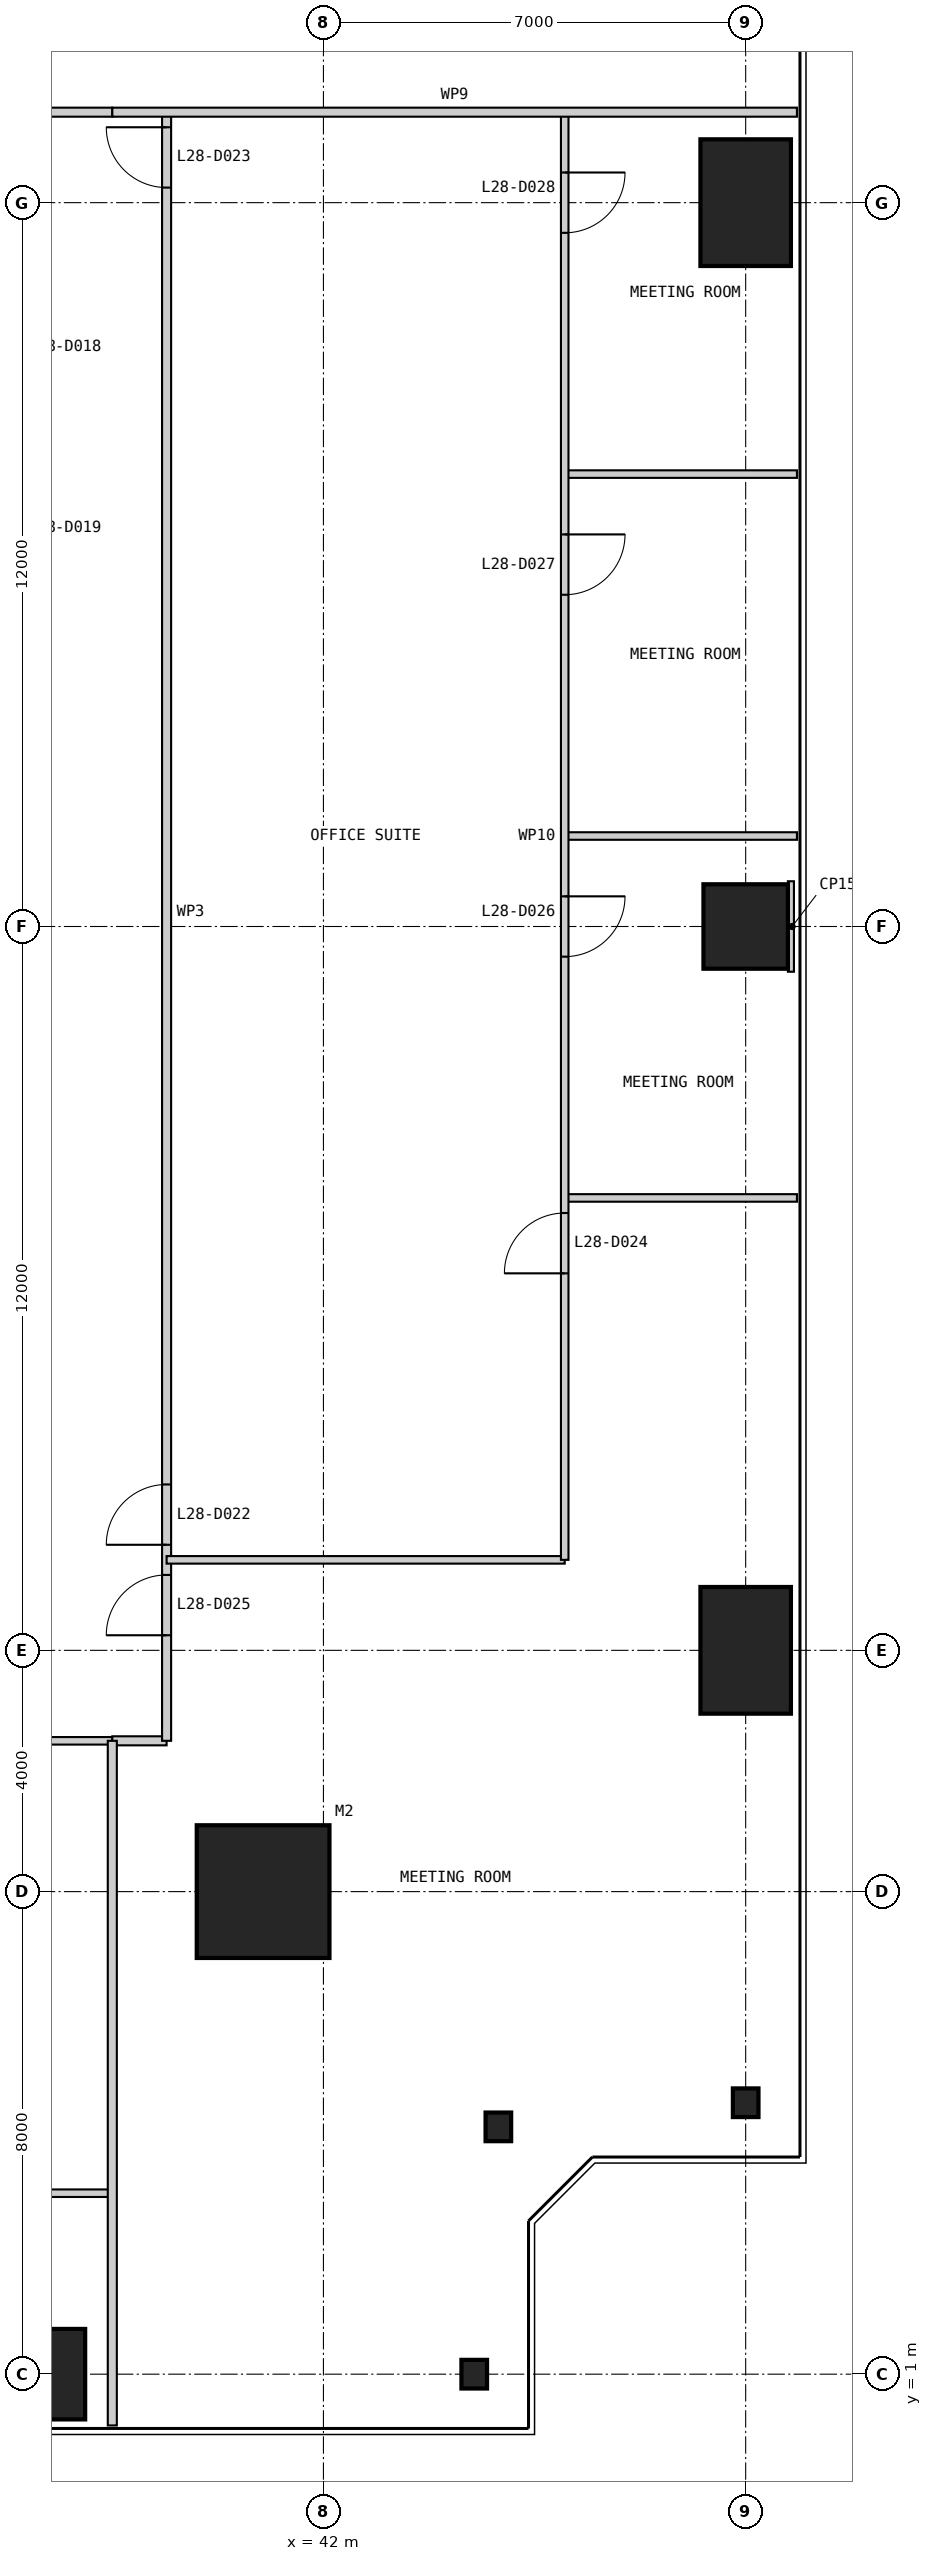
"""IFC4 building model, lengths in metres.
Left out: names, types, materials, properties, quantities, classifications, styles, units other than length and angle.
Written with IfcOpenShell. Run it as: python <this file> out.ifc"""

import sys

from ifc_helpers import new_model, si_unit, direction, frame, frame_2d, origin, origin_2d, place, context, subcontext, project, spatial, rectangle, i_section, extrude, element, fill, save


model = new_model("IFC4")
c1 = context("Model", 3, precision=1e-05, world=origin(), true_north=direction((0.0, 1.0)))
c2 = subcontext(c1, "Body", "Model", "MODEL_VIEW")
j1 = project(units=[si_unit("LENGTHUNIT", "METRE"), si_unit("PLANEANGLEUNIT", "RADIAN")], contexts=[c1])
p1 = place(None, origin())
s1 = spatial("IfcSite", under=j1, at=p1, CompositionType="ELEMENT")
p2 = place(p1, origin())
s2 = spatial("IfcBuilding", under=s1, at=p2, CompositionType="ELEMENT")
p3 = place(p2, frame((0.0, 0.0, 122.4)))
s3 = spatial("IfcBuildingStorey", under=s2, at=p3, CompositionType="ELEMENT", Elevation=122.4)
p4 = place(p3, frame((41.0, 9.0, 0.0), z_axis=(0.0, 0.0, 1.0), x_axis=(1.0, 0.0, 0.0)))
e1 = element("IfcColumn", 1, at=p4, inside=s3, PredefinedType="COLUMN", context=c2, shape_type="SweptSolid", body=[
    extrude(rectangle(XDim=2.2, YDim=2.2, at=origin_2d()), origin(), (0.0, 0.0, 1.0), 4.0),
])
p5 = place(p3, frame((37.0, 1.0, 0.0), z_axis=(0.0, 0.0, 1.0), x_axis=(1.0, 0.0, 0.0)))
e2 = element("IfcColumn", 2, at=p5, inside=s3, PredefinedType="COLUMN", context=c2, shape_type="SweptSolid", body=[
    extrude(rectangle(XDim=2.1, YDim=1.5, at=origin_2d()), origin(), (0.0, 0.0, 1.0), 4.0),
])
for number, where, z_axis, x_axis in (
    (3, (44.5, 1.0, 0.0), (0.0, 0.0, 1.0), (1.0, 0.0, 0.0)),
    (4, (44.9, 5.1, 0.0), (0.0, 0.0, 1.0), (1.0, 0.0, 0.0)),
    (5, (49.0, 5.5, 0.0), (0.0, 0.0, 1.0), (1.0, 0.0, 0.0)),
):
    element("IfcColumn", number, at=place(p3, frame(where, z_axis=z_axis, x_axis=x_axis)), inside=s3, PredefinedType="COLUMN", context=c2, shape_type="SweptSolid", body=[
        extrude(i_section(OverallWidth=0.424, OverallDepth=0.475, WebThickness=0.048, FlangeThickness=0.077, at=origin_2d()), origin(), (0.0, 0.0, 1.0), 4.0),
    ])
p6 = place(p3, frame((49.0, 13.0, 0.0), z_axis=(0.0, 0.0, 1.0), x_axis=(1.0, 0.0, 0.0)))
e6 = element("IfcColumn", 6, at=p6, inside=s3, PredefinedType="COLUMN", context=c2, shape_type="SweptSolid", body=[
    extrude(rectangle(XDim=1.5, YDim=2.1, at=origin_2d()), origin(), (0.0, 0.0, 1.0), 4.0),
])
p7 = place(p3, frame((49.0, 25.0, 0.0), z_axis=(0.0, 0.0, 1.0), x_axis=(1.0, 0.0, 0.0)))
e7 = element("IfcColumn", 7, at=p7, inside=s3, PredefinedType="COLUMN", context=c2, shape_type="SweptSolid", body=[
    extrude(rectangle(XDim=1.4, YDim=1.4, at=origin_2d()), origin(), (0.0, 0.0, 1.0), 4.0),
])
p8 = place(p3, frame((49.0, 37.0, 0.0), z_axis=(0.0, 0.0, 1.0), x_axis=(1.0, 0.0, 0.0)))
e8 = element("IfcColumn", 8, at=p8, inside=s3, PredefinedType="COLUMN", context=c2, shape_type="SweptSolid", body=[
    extrude(rectangle(XDim=1.5, YDim=2.1, at=origin_2d()), origin(), (0.0, 0.0, 1.0), 4.0),
])
p9 = place(p3, frame((32.5, 4.0, 0.0), z_axis=(0.0, 0.0, 1.0), x_axis=(1.0, 0.0, 0.0)))
e9 = element("IfcWall", 9, at=p9, inside=s3, PredefinedType="PARTITIONING", context=c2, shape_type="SweptSolid", body=[
    extrude(rectangle(XDim=6.0, YDim=0.125, at=frame_2d((3.0, 0.0))), origin(), (0.0, 0.0, 1.0), 3.85),
])
p10 = place(p3, frame((35.5, 11.5, 0.0), z_axis=(0.0, 0.0, 1.0), x_axis=(1.0, 0.0, 0.0)))
e10 = element("IfcWall", 10, at=p10, inside=s3, PredefinedType="PARTITIONING", context=c2, shape_type="SweptSolid", body=[
    extrude(rectangle(XDim=3.0, YDim=0.125, at=frame_2d((1.5, 0.0))), origin(), (0.0, 0.0, 1.0), 3.85),
])
p11 = place(p3, frame((38.5, 11.5, 0.0), z_axis=(0.0, 0.0, 1.0), x_axis=(1.0, 0.0, 0.0)))
e11 = element("IfcWall", 11, at=p11, inside=s3, PredefinedType="PARTITIONING", context=c2, shape_type="SweptSolid", body=[
    extrude(rectangle(XDim=0.9, YDim=0.15, at=frame_2d((0.45, 0.0))), origin(), (0.0, 0.0, 1.0), 3.85),
])
p12 = place(p3, frame((39.4, 11.5, 0.0), z_axis=(0.0, 0.0, 1.0), x_axis=(0.0, 1.0, 0.0)))
e12 = element("IfcWall", 12, at=p12, inside=s3, PredefinedType="PARTITIONING", context=c2, shape_type="SweptSolid", body=[
    extrude(rectangle(XDim=27.0, YDim=0.15, at=frame_2d((13.5, 0.0))), origin(), (0.0, 0.0, 1.0), 3.85),
])
p13 = place(p12, frame((3.25, 0.0, 0.0)))
e13 = element("IfcOpeningElement", 13, at=p13, cuts=e12, PredefinedType="OPENING", context=c2, shape_type="SweptSolid", body=[
    extrude(rectangle(XDim=1.0, YDim=2.2, at=frame_2d((0.5, 1.1))), frame((0.0, 0.085, 0.0), z_axis=(0.0, -1.0, 0.0), x_axis=(1.0, 0.0, 0.0)), (0.0, 0.0, 1.0), 0.17),
])
p14 = place(p12, frame((25.75, 0.0, 0.0)))
e14 = element("IfcOpeningElement", 14, at=p14, cuts=e12, PredefinedType="OPENING", context=c2, shape_type="SweptSolid", body=[
    extrude(rectangle(XDim=1.0, YDim=2.2, at=frame_2d((0.5, 1.1))), frame((0.0, 0.085, 0.0), z_axis=(0.0, -1.0, 0.0), x_axis=(1.0, 0.0, 0.0)), (0.0, 0.0, 1.0), 0.17),
])
p15 = place(p12, frame((1.75, 0.0, 0.0)))
e15 = element("IfcOpeningElement", 15, at=p15, cuts=e12, PredefinedType="OPENING", context=c2, shape_type="SweptSolid", body=[
    extrude(rectangle(XDim=1.0, YDim=2.2, at=frame_2d((0.5, 1.1))), frame((0.0, 0.085, 0.0), z_axis=(0.0, -1.0, 0.0), x_axis=(1.0, 0.0, 0.0)), (0.0, 0.0, 1.0), 0.17),
])
p16 = place(p3, frame((38.5, 0.15, 0.0), z_axis=(0.0, 0.0, 1.0), x_axis=(0.0, 1.0, 0.0)))
e16 = element("IfcWall", 16, at=p16, inside=s3, PredefinedType="PARTITIONING", context=c2, shape_type="SweptSolid", body=[
    extrude(rectangle(XDim=11.35, YDim=0.15, at=frame_2d((5.675, 0.0))), origin(), (0.0, 0.0, 1.0), 3.85),
])
p17 = place(p3, frame((46.0, 14.5, 0.0), z_axis=(0.0, 0.0, 1.0), x_axis=(-1.0, 0.0, 0.0)))
e17 = element("IfcWall", 17, at=p17, inside=s3, PredefinedType="PARTITIONING", context=c2, shape_type="SweptSolid", body=[
    extrude(rectangle(XDim=6.6, YDim=0.125, at=frame_2d((3.3, 0.0))), origin(), (0.0, 0.0, 1.0), 3.85),
])
for number, where, z_axis, x_axis in (
    (18, (49.85, 20.5, 0.0), (0.0, 0.0, 1.0), (-1.0, 0.0, 0.0)),
    (19, (49.85, 26.5, 0.0), (0.0, 0.0, 1.0), (-1.0, 0.0, 0.0)),
    (20, (49.85, 32.5, 0.0), (0.0, 0.0, 1.0), (-1.0, 0.0, 0.0)),
):
    element("IfcWall", number, at=place(p3, frame(where, z_axis=z_axis, x_axis=x_axis)), inside=s3, PredefinedType="PARTITIONING", context=c2, shape_type="SweptSolid", body=[
        extrude(rectangle(XDim=3.85, YDim=0.125, at=frame_2d((1.925, 0.0))), origin(), (0.0, 0.0, 1.0), 3.85),
    ])
p18 = place(p3, frame((46.0, 14.5, 0.0), z_axis=(0.0, 0.0, 1.0), x_axis=(0.0, 1.0, 0.0)))
e21 = element("IfcWall", 21, at=p18, inside=s3, PredefinedType="PARTITIONING", context=c2, shape_type="SweptSolid", body=[
    extrude(rectangle(XDim=24.0, YDim=0.125, at=frame_2d((12.0, 0.0))), origin(), (0.0, 0.0, 1.0), 3.238),
])
p19 = place(p18, frame((4.75, 0.0, 0.0)))
e22 = element("IfcOpeningElement", 22, at=p19, cuts=e21, PredefinedType="OPENING", context=c2, shape_type="SweptSolid", body=[
    extrude(rectangle(XDim=1.0, YDim=2.2, at=frame_2d((0.5, 1.1))), frame((0.0, 0.073, 0.0), z_axis=(0.0, -1.0, 0.0), x_axis=(1.0, 0.0, 0.0)), (0.0, 0.0, 1.0), 0.145),
])
p20 = place(p18, frame((10.0, 0.0, 0.0)))
e23 = element("IfcOpeningElement", 23, at=p20, cuts=e21, PredefinedType="OPENING", context=c2, shape_type="SweptSolid", body=[
    extrude(rectangle(XDim=1.0, YDim=2.2, at=frame_2d((0.5, 1.1))), frame((0.0, 0.073, 0.0), z_axis=(0.0, -1.0, 0.0), x_axis=(1.0, 0.0, 0.0)), (0.0, 0.0, 1.0), 0.145),
])
p21 = place(p18, frame((16.0, 0.0, 0.0)))
e24 = element("IfcOpeningElement", 24, at=p21, cuts=e21, PredefinedType="OPENING", context=c2, shape_type="SweptSolid", body=[
    extrude(rectangle(XDim=1.0, YDim=2.2, at=frame_2d((0.5, 1.1))), frame((0.0, 0.073, 0.0), z_axis=(0.0, -1.0, 0.0), x_axis=(1.0, 0.0, 0.0)), (0.0, 0.0, 1.0), 0.145),
])
p22 = place(p18, frame((22.0, 0.0, 0.0)))
e25 = element("IfcOpeningElement", 25, at=p22, cuts=e21, PredefinedType="OPENING", context=c2, shape_type="SweptSolid", body=[
    extrude(rectangle(XDim=1.0, YDim=2.2, at=frame_2d((0.5, 1.1))), frame((0.0, 0.073, 0.0), z_axis=(0.0, -1.0, 0.0), x_axis=(1.0, 0.0, 0.0)), (0.0, 0.0, 1.0), 0.145),
])
p23 = place(p3, frame((38.5, 38.5, 0.0), z_axis=(0.0, 0.0, 1.0), x_axis=(-1.0, 0.0, 0.0)))
e26 = element("IfcWall", 26, at=p23, inside=s3, PredefinedType="PARTITIONING", context=c2, shape_type="SweptSolid", body=[
    extrude(rectangle(XDim=27.0, YDim=0.15, at=frame_2d((13.5, 0.0))), origin(), (0.0, 0.0, 1.0), 3.85),
])
p24 = place(p23, frame((2.5, 0.0, 0.0)))
e27 = element("IfcOpeningElement", 27, at=p24, cuts=e26, PredefinedType="OPENING", context=c2, shape_type="SweptSolid", body=[
    extrude(rectangle(XDim=1.0, YDim=2.2, at=frame_2d((0.5, 1.1))), frame((0.0, 0.085, 0.0), z_axis=(0.0, -1.0, 0.0), x_axis=(1.0, 0.0, 0.0)), (0.0, 0.0, 1.0), 0.17),
])
p25 = place(p23, frame((16.0, 0.0, 0.0)))
e28 = element("IfcOpeningElement", 28, at=p25, cuts=e26, PredefinedType="OPENING", context=c2, shape_type="SweptSolid", body=[
    extrude(rectangle(XDim=1.0, YDim=2.2, at=frame_2d((0.5, 1.1))), frame((0.0, 0.085, 0.0), z_axis=(0.0, -1.0, 0.0), x_axis=(1.0, 0.0, 0.0)), (0.0, 0.0, 1.0), 0.17),
])
p26 = place(p3, frame((49.85, 38.5, 0.0), z_axis=(0.0, 0.0, 1.0), x_axis=(-1.0, 0.0, 0.0)))
e29 = element("IfcWall", 29, at=p26, inside=s3, PredefinedType="PARTITIONING", context=c2, shape_type="SweptSolid", body=[
    extrude(rectangle(XDim=11.35, YDim=0.15, at=frame_2d((5.675, 0.0))), origin(), (0.0, 0.0, 1.0), 3.85),
])
p27 = place(p3, frame((49.8, 25.0, 0.0), z_axis=(0.0, 0.0, 1.0), x_axis=(-1.0, 0.0, 0.0)))
e30 = element("IfcWall", 30, at=p27, inside=s3, PredefinedType="PARTITIONING", context=c2, shape_type="SweptSolid", body=[
    extrude(rectangle(XDim=0.1, YDim=1.5, at=frame_2d((0.05, 0.0))), origin(), (0.0, 0.0, 1.0), 3.85),
])
p28 = place(p13, origin())
e31 = element("IfcDoor", 31, at=p28, inside=s3, OperationType="SINGLE_SWING_LEFT", PredefinedType="DOOR", context=c2, shape_type="SweptSolid", body=[
    extrude(rectangle(XDim=1.0, YDim=2.2, at=frame_2d((0.5, 1.1))), frame((0.0, 0.025, 0.0), z_axis=(0.0, -1.0, 0.0), x_axis=(1.0, 0.0, 0.0)), (0.0, 0.0, 1.0), 0.05),
])
fill(e13, e31)
p29 = place(p14, origin())
e32 = element("IfcDoor", 32, at=p29, inside=s3, OperationType="SINGLE_SWING_RIGHT", PredefinedType="DOOR", context=c2, shape_type="SweptSolid", body=[
    extrude(rectangle(XDim=1.0, YDim=2.2, at=frame_2d((0.5, 1.1))), frame((0.0, 0.025, 0.0), z_axis=(0.0, -1.0, 0.0), x_axis=(1.0, 0.0, 0.0)), (0.0, 0.0, 1.0), 0.05),
])
fill(e14, e32)
p30 = place(p19, origin())
e33 = element("IfcDoor", 33, at=p30, inside=s3, OperationType="SINGLE_SWING_LEFT", PredefinedType="DOOR", context=c2, shape_type="SweptSolid", body=[
    extrude(rectangle(XDim=1.0, YDim=2.2, at=frame_2d((0.5, 1.1))), frame((0.0, 0.025, 0.0), z_axis=(0.0, -1.0, 0.0), x_axis=(1.0, 0.0, 0.0)), (0.0, 0.0, 1.0), 0.05),
])
fill(e22, e33)
p31 = place(p15, origin())
e34 = element("IfcDoor", 34, at=p31, inside=s3, OperationType="SINGLE_SWING_LEFT", PredefinedType="DOOR", context=c2, shape_type="SweptSolid", body=[
    extrude(rectangle(XDim=1.0, YDim=2.2, at=frame_2d((0.5, 1.1))), frame((0.0, 0.025, 0.0), z_axis=(0.0, -1.0, 0.0), x_axis=(1.0, 0.0, 0.0)), (0.0, 0.0, 1.0), 0.05),
])
fill(e15, e34)
p32 = place(p20, frame((1.0, 0.0, 0.0), z_axis=(0.0, 0.0, 1.0), x_axis=(-1.0, 0.0, 0.0)))
e35 = element("IfcDoor", 35, at=p32, inside=s3, OperationType="SINGLE_SWING_LEFT", PredefinedType="DOOR", context=c2, shape_type="SweptSolid", body=[
    extrude(rectangle(XDim=1.0, YDim=2.2, at=frame_2d((0.5, 1.1))), frame((0.0, 0.025, 0.0), z_axis=(0.0, -1.0, 0.0), x_axis=(1.0, 0.0, 0.0)), (0.0, 0.0, 1.0), 0.05),
])
fill(e23, e35)
p33 = place(p21, frame((1.0, 0.0, 0.0), z_axis=(0.0, 0.0, 1.0), x_axis=(-1.0, 0.0, 0.0)))
e36 = element("IfcDoor", 36, at=p33, inside=s3, OperationType="SINGLE_SWING_LEFT", PredefinedType="DOOR", context=c2, shape_type="SweptSolid", body=[
    extrude(rectangle(XDim=1.0, YDim=2.2, at=frame_2d((0.5, 1.1))), frame((0.0, 0.025, 0.0), z_axis=(0.0, -1.0, 0.0), x_axis=(1.0, 0.0, 0.0)), (0.0, 0.0, 1.0), 0.05),
])
fill(e24, e36)
p34 = place(p22, frame((1.0, 0.0, 0.0), z_axis=(0.0, 0.0, 1.0), x_axis=(-1.0, 0.0, 0.0)))
e37 = element("IfcDoor", 37, at=p34, inside=s3, OperationType="SINGLE_SWING_LEFT", PredefinedType="DOOR", context=c2, shape_type="SweptSolid", body=[
    extrude(rectangle(XDim=1.0, YDim=2.2, at=frame_2d((0.5, 1.1))), frame((0.0, 0.025, 0.0), z_axis=(0.0, -1.0, 0.0), x_axis=(1.0, 0.0, 0.0)), (0.0, 0.0, 1.0), 0.05),
])
fill(e25, e37)
save(model, sys.argv[1])
